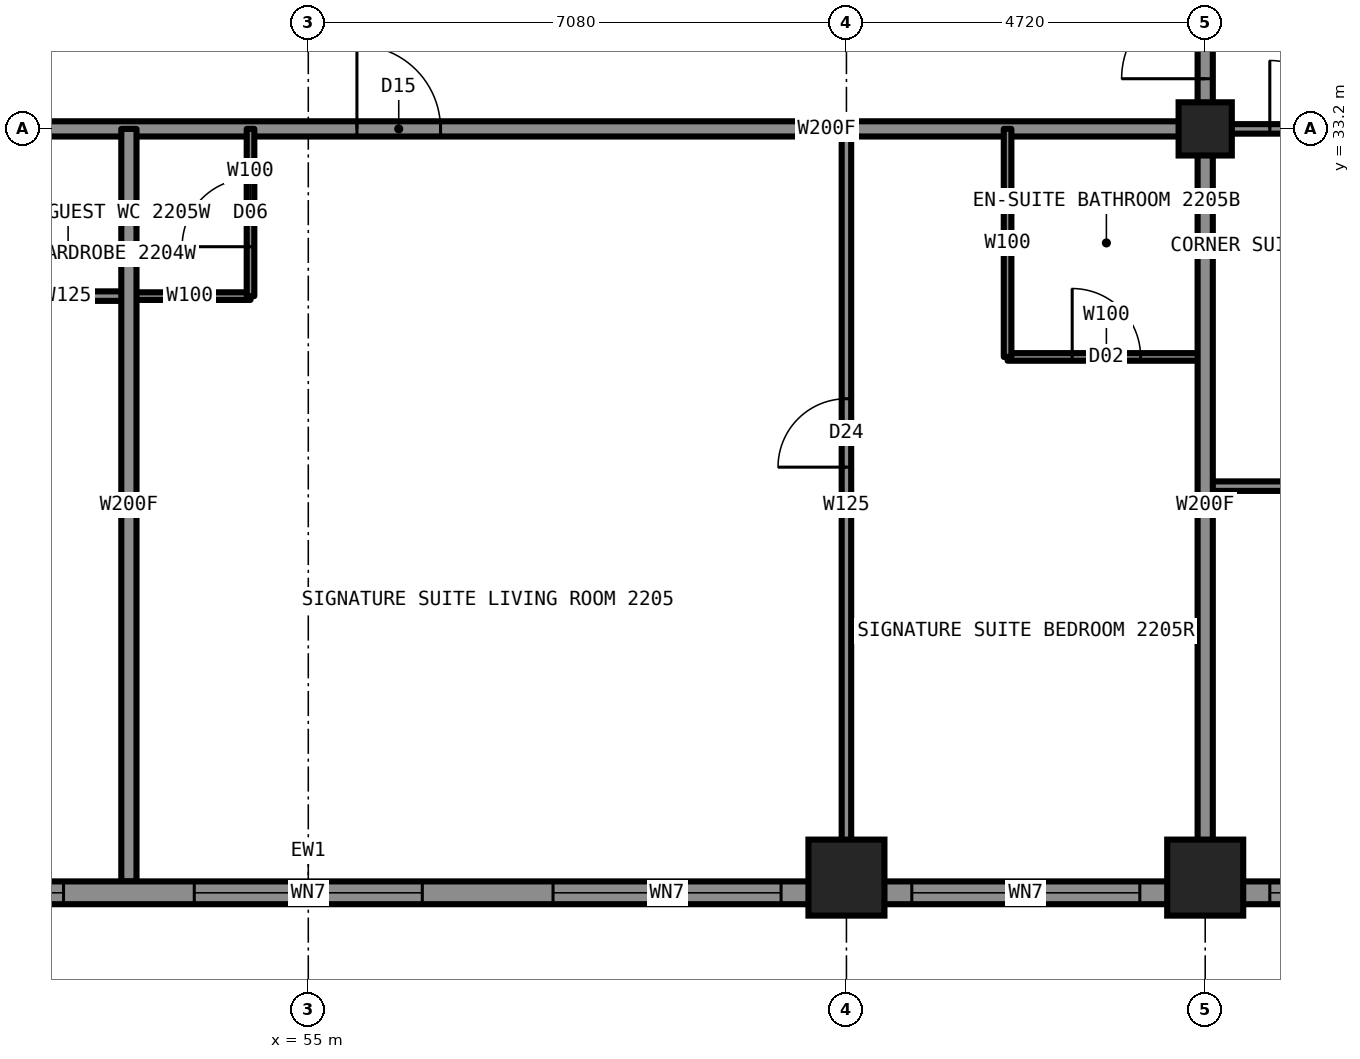
"""IFC4 building model, lengths in metres.
Left out: names, types, materials, properties, quantities, classifications, styles, units other than length and angle.
Written with IfcOpenShell. Run it as: python <this file> out.ifc"""

import sys

from ifc_helpers import new_model, si_unit, direction, frame, frame_2d, origin, origin_2d, place, context, subcontext, project, spatial, rectangle, hollow_rectangle, i_section, extrude, element, fill, save


model = new_model("IFC4")
c1 = context("Model", 3, precision=1e-05, world=origin(), true_north=direction((0.0, 1.0)))
c2 = subcontext(c1, "Body", "Model", "MODEL_VIEW")
j1 = project(units=[si_unit("LENGTHUNIT", "METRE"), si_unit("PLANEANGLEUNIT", "RADIAN")], contexts=[c1])
p1 = place(None, origin())
s1 = spatial("IfcSite", under=j1, at=p1, CompositionType="ELEMENT")
p2 = place(p1, origin())
s2 = spatial("IfcBuilding", under=s1, at=p2, CompositionType="ELEMENT")
p3 = place(p2, frame((0.0, 0.0, 81.0)))
s3 = spatial("IfcBuildingStorey", under=s2, at=p3, CompositionType="ELEMENT", Elevation=81.0)
for number, where, z_axis, x_axis in (
    (1, (62.08, 23.35, 0.0), (0.0, 0.0, 1.0), (1.0, 0.0, 0.0)),
    (2, (66.8, 23.35, 0.0), (0.0, 0.0, 1.0), (1.0, 0.0, 0.0)),
):
    element("IfcColumn", number, at=place(p3, frame(where, z_axis=z_axis, x_axis=x_axis)), inside=s3, PredefinedType="COLUMN", context=c2, shape_type="SweptSolid", body=[
        extrude(i_section(OverallWidth=0.432, OverallDepth=0.498, WebThickness=0.056, FlangeThickness=0.089, at=origin_2d()), origin(), (0.0, 0.0, 1.0), 3.5),
    ])
p4 = place(p3, frame((66.8, 33.2, 0.0), z_axis=(0.0, 0.0, 1.0), x_axis=(1.0, 0.0, 0.0)))
e3 = element("IfcColumn", 3, at=p4, inside=s3, PredefinedType="COLUMN", context=c2, shape_type="SweptSolid", body=[
    extrude(hollow_rectangle(XDim=0.7, YDim=0.7, WallThickness=0.06, at=origin_2d()), origin(), (0.0, 0.0, 1.0), 3.5),
])
p5 = place(p3, frame((43.2, 33.2, 0.0), z_axis=(0.0, 0.0, 1.0), x_axis=(1.0, 0.0, 0.0)))
e4 = element("IfcWall", 4, at=p5, inside=s3, PredefinedType="PARTITIONING", context=c2, shape_type="SweptSolid", body=[
    extrude(rectangle(XDim=23.6, YDim=0.2, at=frame_2d((11.8, 0.0))), origin(), (0.0, 0.0, 1.0), 3.33),
])
p6 = place(p5, frame((3.0, 0.0, 0.0)))
e5 = element("IfcOpeningElement", 5, at=p6, cuts=e4, PredefinedType="OPENING", context=c2, shape_type="SweptSolid", body=[
    extrude(rectangle(XDim=1.0, YDim=2.2, at=frame_2d((0.5, 1.1))), frame((0.0, 0.11, 0.0), z_axis=(0.0, -1.0, 0.0), x_axis=(1.0, 0.0, 0.0)), (0.0, 0.0, 1.0), 0.22),
])
p7 = place(p5, frame((11.29, 0.0, 0.0)))
e6 = element("IfcOpeningElement", 6, at=p7, cuts=e4, PredefinedType="OPENING", context=c2, shape_type="SweptSolid", body=[
    extrude(rectangle(XDim=1.1, YDim=2.2, at=frame_2d((0.55, 1.1))), frame((0.0, 0.11, 0.0), z_axis=(0.0, -1.0, 0.0), x_axis=(1.0, 0.0, 0.0)), (0.0, 0.0, 1.0), 0.22),
])
p8 = place(p3, frame((66.8, 33.2, 0.0), z_axis=(0.0, 0.0, 1.0), x_axis=(1.0, 0.0, 0.0)))
e7 = element("IfcWall", 7, at=p8, inside=s3, PredefinedType="PARTITIONING", context=c2, shape_type="SweptSolid", body=[
    extrude(rectangle(XDim=9.9, YDim=0.125, at=frame_2d((4.95, 0.0))), origin(), (0.0, 0.0, 1.0), 2.573),
])
p9 = place(p8, frame((0.85, 0.0, 0.0)))
e8 = element("IfcOpeningElement", 8, at=p9, cuts=e7, PredefinedType="OPENING", context=c2, shape_type="SweptSolid", body=[
    extrude(rectangle(XDim=0.9, YDim=2.2, at=frame_2d((0.45, 1.1))), frame((0.0, 0.073, 0.0), z_axis=(0.0, -1.0, 0.0), x_axis=(1.0, 0.0, 0.0)), (0.0, 0.0, 1.0), 0.145),
])
p10 = place(p3, frame((52.64, 31.0, 0.0), z_axis=(0.0, 0.0, 1.0), x_axis=(1.0, 0.0, 0.0)))
e9 = element("IfcWall", 9, at=p10, inside=s3, PredefinedType="PARTITIONING", context=c2, shape_type="SweptSolid", body=[
    extrude(rectangle(XDim=1.6, YDim=0.1, at=frame_2d((0.8, 0.0))), origin(), (0.0, 0.0, 1.0), 3.33),
])
p11 = place(p3, frame((51.04, 31.0, 0.0), z_axis=(0.0, 0.0, 1.0), x_axis=(1.0, 0.0, 0.0)))
e10 = element("IfcWall", 10, at=p11, inside=s3, PredefinedType="PARTITIONING", context=c2, shape_type="SweptSolid", body=[
    extrude(rectangle(XDim=1.6, YDim=0.125, at=frame_2d((0.8, 0.0))), origin(), (0.0, 0.0, 1.0), 3.33),
])
p12 = place(p3, frame((64.2, 30.2, 0.0), z_axis=(0.0, 0.0, 1.0), x_axis=(1.0, 0.0, 0.0)))
e11 = element("IfcWall", 11, at=p12, inside=s3, PredefinedType="PARTITIONING", context=c2, shape_type="SweptSolid", body=[
    extrude(rectangle(XDim=2.6, YDim=0.1, at=frame_2d((1.3, 0.0))), origin(), (0.0, 0.0, 1.0), 3.33),
])
p13 = place(p12, frame((0.85, 0.0, 0.0)))
e12 = element("IfcOpeningElement", 12, at=p13, cuts=e11, PredefinedType="OPENING", context=c2, shape_type="SweptSolid", body=[
    extrude(rectangle(XDim=0.9, YDim=2.1, at=frame_2d((0.45, 1.05))), frame((0.0, 0.06, 0.0), z_axis=(0.0, -1.0, 0.0), x_axis=(1.0, 0.0, 0.0)), (0.0, 0.0, 1.0), 0.12),
])
p14 = place(p3, frame((66.8, 28.5, 0.0), z_axis=(0.0, 0.0, 1.0), x_axis=(1.0, 0.0, 0.0)))
e13 = element("IfcWall", 13, at=p14, inside=s3, PredefinedType="PARTITIONING", context=c2, shape_type="SweptSolid", body=[
    extrude(rectangle(XDim=9.894, YDim=0.125, at=frame_2d((4.947, 0.0))), origin(), (0.0, 0.0, 1.0), 3.33),
])
p15 = place(p14, frame((1.75, 0.0, 0.0)))
e14 = element("IfcOpeningElement", 14, at=p15, cuts=e13, PredefinedType="OPENING", context=c2, shape_type="SweptSolid", body=[
    extrude(rectangle(XDim=0.9, YDim=2.2, at=frame_2d((0.45, 1.1))), frame((0.0, 0.073, 0.0), z_axis=(0.0, -1.0, 0.0), x_axis=(1.0, 0.0, 0.0)), (0.0, 0.0, 1.0), 0.145),
])
p16 = place(p3, frame((54.24, 31.0, 0.0), z_axis=(0.0, 0.0, 1.0), x_axis=(0.0, 1.0, 0.0)))
e15 = element("IfcWall", 15, at=p16, inside=s3, PredefinedType="PARTITIONING", context=c2, shape_type="SweptSolid", body=[
    extrude(rectangle(XDim=2.2, YDim=0.1, at=frame_2d((1.1, 0.0))), origin(), (0.0, 0.0, 1.0), 3.33),
])
p17 = place(p16, frame((0.65, 0.0, 0.0)))
e16 = element("IfcOpeningElement", 16, at=p17, cuts=e15, PredefinedType="OPENING", context=c2, shape_type="SweptSolid", body=[
    extrude(rectangle(XDim=0.9, YDim=2.1, at=frame_2d((0.45, 1.05))), frame((0.0, 0.06, 0.0), z_axis=(0.0, -1.0, 0.0), x_axis=(1.0, 0.0, 0.0)), (0.0, 0.0, 1.0), 0.12),
])
p18 = place(p3, frame((52.64, 23.3, 0.0), z_axis=(0.0, 0.0, 1.0), x_axis=(0.0, 1.0, 0.0)))
e17 = element("IfcWall", 17, at=p18, inside=s3, PredefinedType="PARTITIONING", context=c2, shape_type="SweptSolid", body=[
    extrude(rectangle(XDim=9.9, YDim=0.2, at=frame_2d((4.95, 0.0))), origin(), (0.0, 0.0, 1.0), 3.33),
])
p19 = place(p3, frame((66.8, 33.2, 0.0), z_axis=(0.0, 0.0, 1.0), x_axis=(0.0, 1.0, 0.0)))
e18 = element("IfcWall", 18, at=p19, inside=s3, PredefinedType="PARTITIONING", context=c2, shape_type="SweptSolid", body=[
    extrude(rectangle(XDim=23.6, YDim=0.2, at=frame_2d((11.8, 0.0))), origin(), (0.0, 0.0, 1.0), 3.33),
])
p20 = place(p19, frame((7.72, 0.0, 0.0)))
e19 = element("IfcOpeningElement", 19, at=p20, cuts=e18, PredefinedType="OPENING", context=c2, shape_type="SweptSolid", body=[
    extrude(rectangle(XDim=1.0, YDim=2.2, at=frame_2d((0.5, 1.1))), frame((0.0, 0.11, 0.0), z_axis=(0.0, -1.0, 0.0), x_axis=(1.0, 0.0, 0.0)), (0.0, 0.0, 1.0), 0.22),
])
p21 = place(p19, frame((16.42, 0.0, 0.0)))
e20 = element("IfcOpeningElement", 20, at=p21, cuts=e18, PredefinedType="OPENING", context=c2, shape_type="SweptSolid", body=[
    extrude(rectangle(XDim=1.0, YDim=2.2, at=frame_2d((0.5, 1.1))), frame((0.0, 0.11, 0.0), z_axis=(0.0, -1.0, 0.0), x_axis=(1.0, 0.0, 0.0)), (0.0, 0.0, 1.0), 0.22),
])
p22 = place(p19, frame((21.85, 0.0, 0.0)))
e21 = element("IfcOpeningElement", 21, at=p22, cuts=e18, PredefinedType="OPENING", context=c2, shape_type="SweptSolid", body=[
    extrude(rectangle(XDim=1.1, YDim=2.2, at=frame_2d((0.55, 1.1))), frame((0.0, 0.11, 0.0), z_axis=(0.0, -1.0, 0.0), x_axis=(1.0, 0.0, 0.0)), (0.0, 0.0, 1.0), 0.22),
])
p23 = place(p19, frame((0.66, 0.0, 0.0)))
e22 = element("IfcOpeningElement", 22, at=p23, cuts=e18, PredefinedType="OPENING", context=c2, shape_type="SweptSolid", body=[
    extrude(rectangle(XDim=1.1, YDim=2.2, at=frame_2d((0.55, 1.1))), frame((0.0, 0.11, 0.0), z_axis=(0.0, -1.0, 0.0), x_axis=(1.0, 0.0, 0.0)), (0.0, 0.0, 1.0), 0.22),
])
p24 = place(p3, frame((66.8, 23.3, 0.0), z_axis=(0.0, 0.0, 1.0), x_axis=(0.0, 1.0, 0.0)))
e23 = element("IfcWall", 23, at=p24, inside=s3, PredefinedType="PARTITIONING", context=c2, shape_type="SweptSolid", body=[
    extrude(rectangle(XDim=9.9, YDim=0.2, at=frame_2d((4.95, 0.0))), origin(), (0.0, 0.0, 1.0), 2.573),
])
p25 = place(p3, frame((62.08, 23.3, 0.0), z_axis=(0.0, 0.0, 1.0), x_axis=(0.0, 1.0, 0.0)))
e24 = element("IfcWall", 24, at=p25, inside=s3, PredefinedType="PARTITIONING", context=c2, shape_type="SweptSolid", body=[
    extrude(rectangle(XDim=9.9, YDim=0.125, at=frame_2d((4.95, 0.0))), origin(), (0.0, 0.0, 1.0), 2.573),
])
p26 = place(p25, frame((5.45, 0.0, 0.0)))
e25 = element("IfcOpeningElement", 25, at=p26, cuts=e24, PredefinedType="OPENING", context=c2, shape_type="SweptSolid", body=[
    extrude(rectangle(XDim=0.9, YDim=2.2, at=frame_2d((0.45, 1.1))), frame((0.0, 0.073, 0.0), z_axis=(0.0, -1.0, 0.0), x_axis=(1.0, 0.0, 0.0)), (0.0, 0.0, 1.0), 0.145),
])
p27 = place(p3, frame((64.2, 30.2, 0.0), z_axis=(0.0, 0.0, 1.0), x_axis=(0.0, 1.0, 0.0)))
e26 = element("IfcWall", 26, at=p27, inside=s3, PredefinedType="PARTITIONING", context=c2, shape_type="SweptSolid", body=[
    extrude(rectangle(XDim=3.0, YDim=0.1, at=frame_2d((1.5, 0.0))), origin(), (0.0, 0.0, 1.0), 3.33),
])
p28 = place(p3, frame((38.5, 23.15, 0.0), z_axis=(0.0, 0.0, 1.0), x_axis=(1.0, 0.0, 0.0)))
e27 = element("IfcWall", 27, at=p28, inside=s3, PredefinedType="SOLIDWALL", context=c2, shape_type="SweptSolid", body=[
    extrude(rectangle(XDim=33.0, YDim=0.3, at=frame_2d((16.5, 0.0))), origin(), (0.0, 0.0, 1.0), 2.63),
])
p29 = place(p28, frame((0.85, 0.0, 0.5)))
e28 = element("IfcOpeningElement", 28, at=p29, cuts=e27, PredefinedType="OPENING", context=c2, shape_type="SweptSolid", body=[
    extrude(rectangle(XDim=3.0, YDim=2.0, at=frame_2d((1.5, 1.0))), frame((0.0, 0.16, 0.0), z_axis=(0.0, -1.0, 0.0), x_axis=(1.0, 0.0, 0.0)), (0.0, 0.0, 1.0), 0.32),
])
p30 = place(p28, frame((5.56, 0.0, 0.5)))
e29 = element("IfcOpeningElement", 29, at=p30, cuts=e27, PredefinedType="OPENING", context=c2, shape_type="SweptSolid", body=[
    extrude(rectangle(XDim=3.0, YDim=2.0, at=frame_2d((1.5, 1.0))), frame((0.0, 0.16, 0.0), z_axis=(0.0, -1.0, 0.0), x_axis=(1.0, 0.0, 0.0)), (0.0, 0.0, 1.0), 0.32),
])
p31 = place(p28, frame((10.28, 0.0, 0.5)))
e30 = element("IfcOpeningElement", 30, at=p31, cuts=e27, PredefinedType="OPENING", context=c2, shape_type="SweptSolid", body=[
    extrude(rectangle(XDim=3.0, YDim=2.0, at=frame_2d((1.5, 1.0))), frame((0.0, 0.16, 0.0), z_axis=(0.0, -1.0, 0.0), x_axis=(1.0, 0.0, 0.0)), (0.0, 0.0, 1.0), 0.32),
])
p32 = place(p28, frame((15.0, 0.0, 0.5)))
e31 = element("IfcOpeningElement", 31, at=p32, cuts=e27, PredefinedType="OPENING", context=c2, shape_type="SweptSolid", body=[
    extrude(rectangle(XDim=3.0, YDim=2.0, at=frame_2d((1.5, 1.0))), frame((0.0, 0.16, 0.0), z_axis=(0.0, -1.0, 0.0), x_axis=(1.0, 0.0, 0.0)), (0.0, 0.0, 1.0), 0.32),
])
p33 = place(p28, frame((19.72, 0.0, 0.5)))
e32 = element("IfcOpeningElement", 32, at=p33, cuts=e27, PredefinedType="OPENING", context=c2, shape_type="SweptSolid", body=[
    extrude(rectangle(XDim=3.0, YDim=2.0, at=frame_2d((1.5, 1.0))), frame((0.0, 0.16, 0.0), z_axis=(0.0, -1.0, 0.0), x_axis=(1.0, 0.0, 0.0)), (0.0, 0.0, 1.0), 0.32),
])
p34 = place(p28, frame((24.44, 0.0, 0.5)))
e33 = element("IfcOpeningElement", 33, at=p34, cuts=e27, PredefinedType="OPENING", context=c2, shape_type="SweptSolid", body=[
    extrude(rectangle(XDim=3.0, YDim=2.0, at=frame_2d((1.5, 1.0))), frame((0.0, 0.16, 0.0), z_axis=(0.0, -1.0, 0.0), x_axis=(1.0, 0.0, 0.0)), (0.0, 0.0, 1.0), 0.32),
])
p35 = place(p28, frame((29.15, 0.0, 0.5)))
e34 = element("IfcOpeningElement", 34, at=p35, cuts=e27, PredefinedType="OPENING", context=c2, shape_type="SweptSolid", body=[
    extrude(rectangle(XDim=3.0, YDim=2.0, at=frame_2d((1.5, 1.0))), frame((0.0, 0.16, 0.0), z_axis=(0.0, -1.0, 0.0), x_axis=(1.0, 0.0, 0.0)), (0.0, 0.0, 1.0), 0.32),
])
p36 = place(p7, origin())
e35 = element("IfcDoor", 35, at=p36, inside=s3, OperationType="SINGLE_SWING_LEFT", PredefinedType="DOOR", context=c2, shape_type="SweptSolid", body=[
    extrude(rectangle(XDim=1.1, YDim=2.2, at=frame_2d((0.55, 1.1))), frame((0.0, 0.025, 0.0), z_axis=(0.0, -1.0, 0.0), x_axis=(1.0, 0.0, 0.0)), (0.0, 0.0, 1.0), 0.05),
])
fill(e6, e35)
p37 = place(p13, origin())
e36 = element("IfcDoor", 36, at=p37, inside=s3, OperationType="SINGLE_SWING_RIGHT", PredefinedType="DOOR", context=c2, shape_type="SweptSolid", body=[
    extrude(rectangle(XDim=0.9, YDim=2.1, at=frame_2d((0.45, 1.05))), frame((0.0, 0.025, 0.0), z_axis=(0.0, -1.0, 0.0), x_axis=(1.0, 0.0, 0.0)), (0.0, 0.0, 1.0), 0.05),
])
fill(e12, e36)
p38 = place(p26, origin())
e37 = element("IfcDoor", 37, at=p38, inside=s3, OperationType="SINGLE_SWING_LEFT", PredefinedType="DOOR", context=c2, shape_type="SweptSolid", body=[
    extrude(rectangle(XDim=0.9, YDim=2.2, at=frame_2d((0.45, 1.1))), frame((0.0, 0.025, 0.0), z_axis=(0.0, -1.0, 0.0), x_axis=(1.0, 0.0, 0.0)), (0.0, 0.0, 1.0), 0.05),
])
fill(e25, e37)
p39 = place(p17, origin())
e38 = element("IfcDoor", 38, at=p39, inside=s3, OperationType="SINGLE_SWING_LEFT", PredefinedType="DOOR", context=c2, shape_type="SweptSolid", body=[
    extrude(rectangle(XDim=0.9, YDim=2.1, at=frame_2d((0.45, 1.05))), frame((0.0, 0.025, 0.0), z_axis=(0.0, -1.0, 0.0), x_axis=(1.0, 0.0, 0.0)), (0.0, 0.0, 1.0), 0.05),
])
fill(e16, e38)
p40 = place(p9, origin())
e39 = element("IfcDoor", 39, at=p40, inside=s3, OperationType="SINGLE_SWING_LEFT", PredefinedType="DOOR", context=c2, shape_type="SweptSolid", body=[
    extrude(rectangle(XDim=0.9, YDim=2.2, at=frame_2d((0.45, 1.1))), frame((0.0, 0.025, 0.0), z_axis=(0.0, -1.0, 0.0), x_axis=(1.0, 0.0, 0.0)), (0.0, 0.0, 1.0), 0.05),
])
fill(e8, e39)
p41 = place(p23, origin())
e40 = element("IfcDoor", 40, at=p41, inside=s3, OperationType="SINGLE_SWING_LEFT", PredefinedType="DOOR", context=c2, shape_type="SweptSolid", body=[
    extrude(rectangle(XDim=1.1, YDim=2.2, at=frame_2d((0.55, 1.1))), frame((0.0, 0.025, 0.0), z_axis=(0.0, -1.0, 0.0), x_axis=(1.0, 0.0, 0.0)), (0.0, 0.0, 1.0), 0.05),
])
fill(e22, e40)
p42 = place(p31, origin())
e41 = element("IfcWindow", 41, at=p42, inside=s3, PartitioningType="SINGLE_PANEL", PredefinedType="WINDOW", context=c2, shape_type="SweptSolid", body=[
    extrude(rectangle(XDim=3.0, YDim=2.0, at=frame_2d((1.5, 1.0))), frame((0.0, 0.03, 0.0), z_axis=(0.0, -1.0, 0.0), x_axis=(1.0, 0.0, 0.0)), (0.0, 0.0, 1.0), 0.06),
])
fill(e30, e41)
p43 = place(p32, origin())
e42 = element("IfcWindow", 42, at=p43, inside=s3, PartitioningType="SINGLE_PANEL", PredefinedType="WINDOW", context=c2, shape_type="SweptSolid", body=[
    extrude(rectangle(XDim=3.0, YDim=2.0, at=frame_2d((1.5, 1.0))), frame((0.0, 0.03, 0.0), z_axis=(0.0, -1.0, 0.0), x_axis=(1.0, 0.0, 0.0)), (0.0, 0.0, 1.0), 0.06),
])
fill(e31, e42)
p44 = place(p33, origin())
e43 = element("IfcWindow", 43, at=p44, inside=s3, PartitioningType="SINGLE_PANEL", PredefinedType="WINDOW", context=c2, shape_type="SweptSolid", body=[
    extrude(rectangle(XDim=3.0, YDim=2.0, at=frame_2d((1.5, 1.0))), frame((0.0, 0.03, 0.0), z_axis=(0.0, -1.0, 0.0), x_axis=(1.0, 0.0, 0.0)), (0.0, 0.0, 1.0), 0.06),
])
fill(e32, e43)
p45 = place(p34, origin())
e44 = element("IfcWindow", 44, at=p45, inside=s3, PartitioningType="SINGLE_PANEL", PredefinedType="WINDOW", context=c2, shape_type="SweptSolid", body=[
    extrude(rectangle(XDim=3.0, YDim=2.0, at=frame_2d((1.5, 1.0))), frame((0.0, 0.03, 0.0), z_axis=(0.0, -1.0, 0.0), x_axis=(1.0, 0.0, 0.0)), (0.0, 0.0, 1.0), 0.06),
])
fill(e33, e44)
p46 = place(p35, origin())
e45 = element("IfcWindow", 45, at=p46, inside=s3, PartitioningType="SINGLE_PANEL", PredefinedType="WINDOW", context=c2, shape_type="SweptSolid", body=[
    extrude(rectangle(XDim=3.0, YDim=2.0, at=frame_2d((1.5, 1.0))), frame((0.0, 0.03, 0.0), z_axis=(0.0, -1.0, 0.0), x_axis=(1.0, 0.0, 0.0)), (0.0, 0.0, 1.0), 0.06),
])
fill(e34, e45)
save(model, sys.argv[1])
